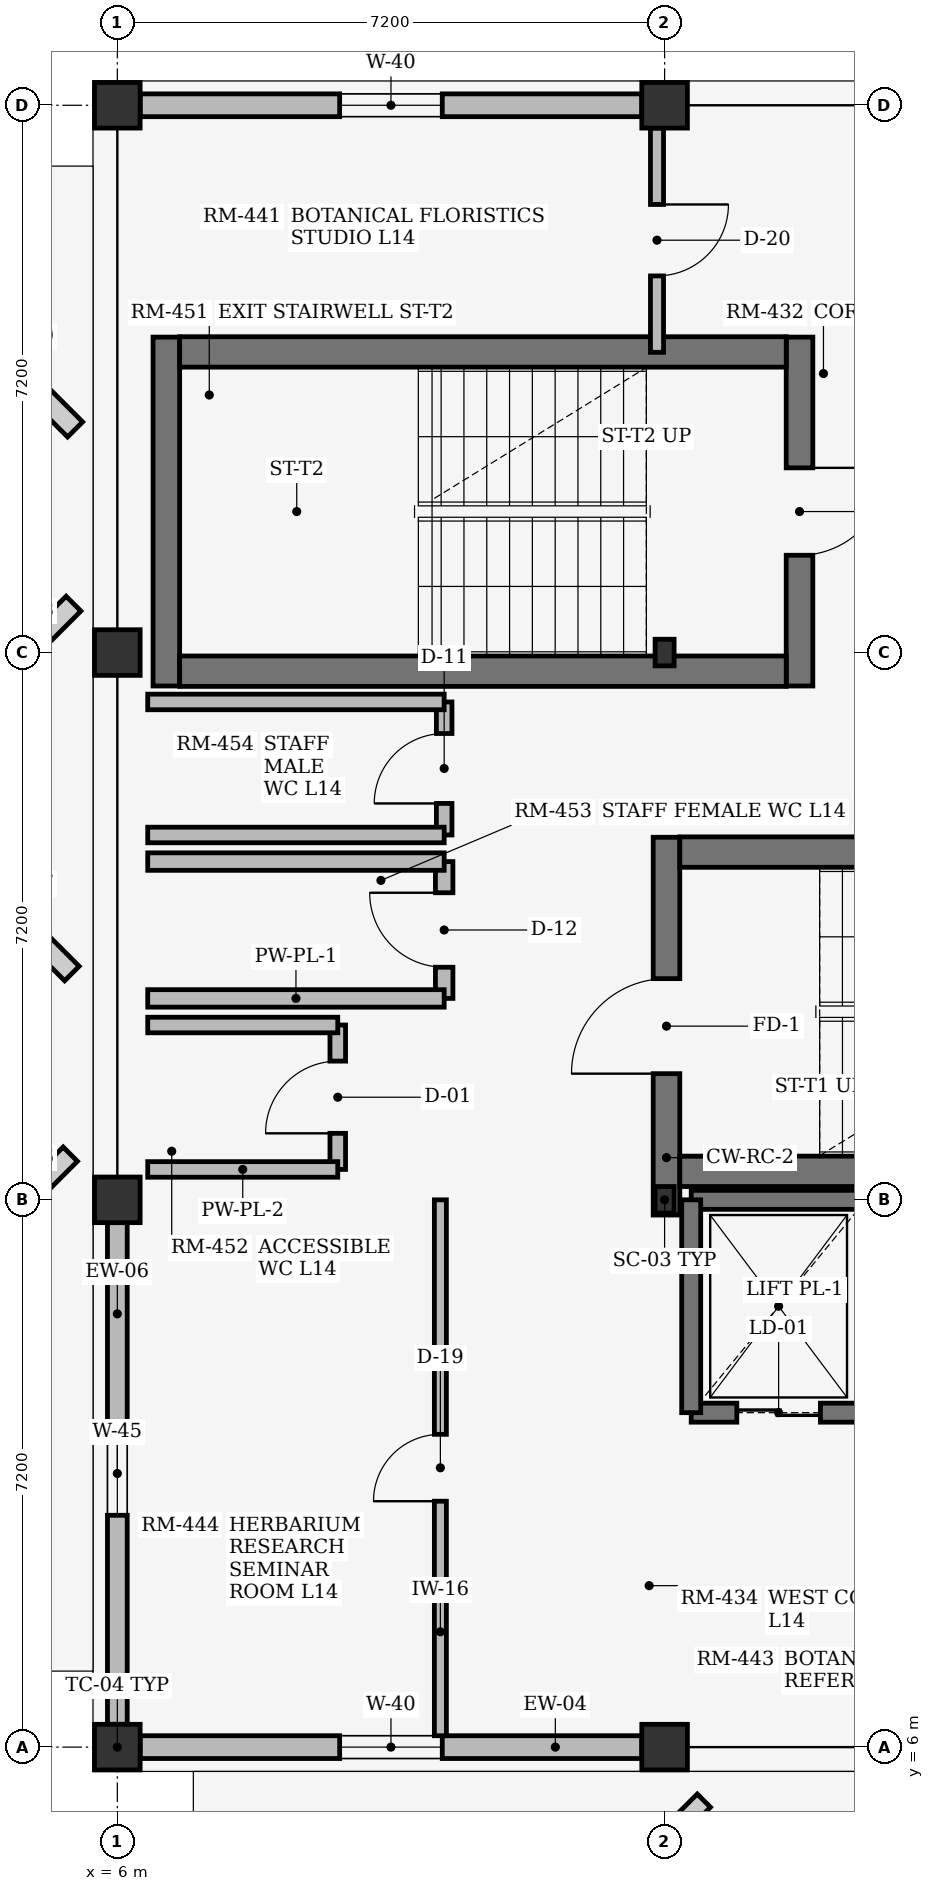
"""IFC4 building model, lengths in metres.
Left out: names, types, materials, properties, quantities, classifications, styles, units other than length and angle.
Written with IfcOpenShell. Run it as: python <this file> out.ifc"""

import sys

from ifc_helpers import new_model, si_unit, direction, frame, frame_2d, origin, origin_2d, place, context, subcontext, project, spatial, rectangle, i_section, extrude, element, fill, save


model = new_model("IFC4")
c1 = context("Model", 3, precision=1e-05, world=origin(), true_north=direction((0.0, 1.0)))
c2 = subcontext(c1, "Body", "Model", "MODEL_VIEW")
j1 = project(units=[si_unit("LENGTHUNIT", "METRE"), si_unit("PLANEANGLEUNIT", "RADIAN")], contexts=[c1])
p1 = place(None, origin())
s1 = spatial("IfcSite", under=j1, at=p1, CompositionType="ELEMENT")
p2 = place(p1, origin())
s2 = spatial("IfcBuilding", under=s1, at=p2, CompositionType="ELEMENT")
p3 = place(p2, frame((0.0, 0.0, 56.1)))
s3 = spatial("IfcBuildingStorey", under=s2, at=p3, CompositionType="ELEMENT", Elevation=56.1)
for number, where, z_axis, x_axis in (
    (1, (6.0, 6.0, 0.0), (0.0, 0.0, 1.0), (1.0, 0.0, 0.0)),
    (2, (6.0, 13.2, 0.0), (0.0, 0.0, 1.0), (1.0, 0.0, 0.0)),
    (3, (6.0, 20.4, 0.0), (0.0, 0.0, 1.0), (1.0, 0.0, 0.0)),
    (4, (6.0, 27.6, 0.0), (0.0, 0.0, 1.0), (1.0, 0.0, 0.0)),
    (5, (13.2, 6.0, 0.0), (0.0, 0.0, 1.0), (1.0, 0.0, 0.0)),
):
    element("IfcColumn", number, at=place(p3, frame(where, z_axis=z_axis, x_axis=x_axis)), inside=s3, PredefinedType="COLUMN", context=c2, shape_type="SweptSolid", body=[
        extrude(rectangle(XDim=0.6, YDim=0.6, at=origin_2d()), origin(), (0.0, 0.0, 1.0), 3.088),
    ])
for number, where, z_axis, x_axis in (
    (6, (13.2, 13.2, 0.0), (0.0, 0.0, 1.0), (1.0, 0.0, 0.0)),
    (7, (13.2, 20.4, 0.0), (0.0, 0.0, 1.0), (1.0, 0.0, 0.0)),
):
    element("IfcColumn", number, at=place(p3, frame(where, z_axis=z_axis, x_axis=x_axis)), inside=s3, PredefinedType="COLUMN", context=c2, shape_type="SweptSolid", body=[
        extrude(i_section(OverallWidth=0.25, OverallDepth=0.35, WebThickness=0.01, FlangeThickness=0.012, at=origin_2d()), origin(), (0.0, 0.0, 1.0), 3.088),
    ])
p4 = place(p3, frame((13.2, 27.6, 0.0), z_axis=(0.0, 0.0, 1.0), x_axis=(1.0, 0.0, 0.0)))
e8 = element("IfcColumn", 8, at=p4, inside=s3, PredefinedType="COLUMN", context=c2, shape_type="SweptSolid", body=[
    extrude(rectangle(XDim=0.6, YDim=0.6, at=origin_2d()), origin(), (0.0, 0.0, 1.0), 3.088),
])
p5 = place(p3, frame((6.3, 6.0, 0.0), z_axis=(0.0, 0.0, 1.0), x_axis=(1.0, 0.0, 0.0)))
e9 = element("IfcWall", 9, at=p5, inside=s3, PredefinedType="STANDARD", context=c2, shape_type="SweptSolid", body=[
    extrude(rectangle(XDim=6.6, YDim=0.3, at=frame_2d((3.3, 0.0))), origin(), (0.0, 0.0, 1.0), 2.695),
])
p6 = place(p5, frame((2.625, 0.0, 0.75)))
e10 = element("IfcOpeningElement", 10, at=p6, cuts=e9, PredefinedType="OPENING", context=c2, shape_type="SweptSolid", body=[
    extrude(rectangle(XDim=1.35, YDim=1.5, at=frame_2d((0.675, 0.75))), frame((0.0, 0.16, 0.0), z_axis=(0.0, -1.0, 0.0), x_axis=(1.0, 0.0, 0.0)), (0.0, 0.0, 1.0), 0.32),
])
p7 = place(p3, frame((6.3, 27.6, 0.0), z_axis=(0.0, 0.0, 1.0), x_axis=(1.0, 0.0, 0.0)))
e11 = element("IfcWall", 11, at=p7, inside=s3, PredefinedType="STANDARD", context=c2, shape_type="SweptSolid", body=[
    extrude(rectangle(XDim=6.6, YDim=0.3, at=frame_2d((3.3, 0.0))), origin(), (0.0, 0.0, 1.0), 2.695),
])
p8 = place(p7, frame((2.625, 0.0, 0.75)))
e12 = element("IfcOpeningElement", 12, at=p8, cuts=e11, PredefinedType="OPENING", context=c2, shape_type="SweptSolid", body=[
    extrude(rectangle(XDim=1.35, YDim=1.5, at=frame_2d((0.675, 0.75))), frame((0.0, 0.16, 0.0), z_axis=(0.0, -1.0, 0.0), x_axis=(1.0, 0.0, 0.0)), (0.0, 0.0, 1.0), 0.32),
])
p9 = place(p3, frame((6.0, 6.3, 0.0), z_axis=(0.0, 0.0, 1.0), x_axis=(0.0, 1.0, 0.0)))
e13 = element("IfcWall", 13, at=p9, inside=s3, PredefinedType="STANDARD", context=c2, shape_type="SweptSolid", body=[
    extrude(rectangle(XDim=6.6, YDim=0.26, at=frame_2d((3.3, 0.0))), origin(), (0.0, 0.0, 1.0), 2.695),
])
p10 = place(p9, frame((2.75, 0.0, 0.75)))
e14 = element("IfcOpeningElement", 14, at=p10, cuts=e13, PredefinedType="OPENING", context=c2, shape_type="SweptSolid", body=[
    extrude(rectangle(XDim=1.1, YDim=1.25, at=frame_2d((0.55, 0.625))), frame((0.0, 0.14, 0.0), z_axis=(0.0, -1.0, 0.0), x_axis=(1.0, 0.0, 0.0)), (0.0, 0.0, 1.0), 0.28),
])
p11 = place(p3, frame((13.225, 13.0, 0.0), z_axis=(0.0, 0.0, 1.0), x_axis=(0.0, 1.0, 0.0)))
e15 = element("IfcWall", 15, at=p11, inside=s3, PredefinedType="SHEAR", context=c2, shape_type="SweptSolid", body=[
    extrude(rectangle(XDim=4.97, YDim=0.35, at=frame_2d((2.485, 0.0))), origin(), (0.0, 0.0, 1.0), 3.115),
])
p12 = place(p11, frame((1.86, 0.0, 0.0)))
e16 = element("IfcOpeningElement", 16, at=p12, cuts=e15, PredefinedType="OPENING", context=c2, shape_type="SweptSolid", body=[
    extrude(rectangle(XDim=1.25, YDim=2.2, at=frame_2d((0.625, 1.1))), frame((0.0, 0.185, 0.0), z_axis=(0.0, -1.0, 0.0), x_axis=(1.0, 0.0, 0.0)), (0.0, 0.0, 1.0), 0.37),
])
for number, where, z_axis, x_axis in (
    (17, (13.4, 13.575, 0.0), (0.0, 0.0, 1.0), (1.0, 0.0, 0.0)),
    (18, (13.4, 17.775, 0.0), (0.0, 0.0, 1.0), (1.0, 0.0, 0.0)),
):
    element("IfcWall", number, at=place(p3, frame(where, z_axis=z_axis, x_axis=x_axis)), inside=s3, PredefinedType="SHEAR", context=c2, shape_type="SweptSolid", body=[
        extrude(rectangle(XDim=7.98, YDim=0.4, at=frame_2d((3.99, 0.0))), origin(), (0.0, 0.0, 1.0), 3.115),
    ])
p13 = place(p3, frame((14.975, 24.55, 0.0), z_axis=(0.0, 0.0, 1.0), x_axis=(0.0, -1.0, 0.0)))
e19 = element("IfcWall", 19, at=p13, inside=s3, PredefinedType="SHEAR", context=c2, shape_type="SweptSolid", body=[
    extrude(rectangle(XDim=4.59, YDim=0.35, at=frame_2d((2.295, 0.0))), origin(), (0.0, 0.0, 1.0), 3.115),
])
p14 = place(p13, frame((1.72, 0.0, 0.0)))
e20 = element("IfcOpeningElement", 20, at=p14, cuts=e19, PredefinedType="OPENING", context=c2, shape_type="SweptSolid", body=[
    extrude(rectangle(XDim=1.15, YDim=2.2, at=frame_2d((0.575, 1.1))), frame((0.0, 0.185, 0.0), z_axis=(0.0, -1.0, 0.0), x_axis=(1.0, 0.0, 0.0)), (0.0, 0.0, 1.0), 0.37),
])
p15 = place(p3, frame((6.645, 24.55, 0.0), z_axis=(0.0, 0.0, 1.0), x_axis=(0.0, -1.0, 0.0)))
e21 = element("IfcWall", 21, at=p15, inside=s3, PredefinedType="SHEAR", context=c2, shape_type="SweptSolid", body=[
    extrude(rectangle(XDim=4.59, YDim=0.35, at=frame_2d((2.295, 0.0))), origin(), (0.0, 0.0, 1.0), 3.115),
])
for number, where, z_axis, x_axis in (
    (22, (14.8, 24.355, 0.0), (0.0, 0.0, 1.0), (-1.0, 0.0, 0.0)),
    (23, (14.8, 20.155, 0.0), (0.0, 0.0, 1.0), (-1.0, 0.0, 0.0)),
):
    element("IfcWall", number, at=place(p3, frame(where, z_axis=z_axis, x_axis=x_axis)), inside=s3, PredefinedType="SHEAR", context=c2, shape_type="SweptSolid", body=[
        extrude(rectangle(XDim=7.98, YDim=0.4, at=frame_2d((3.99, 0.0))), origin(), (0.0, 0.0, 1.0), 3.115),
    ])
p16 = place(p3, frame((13.55, 10.4, 0.0), z_axis=(0.0, 0.0, 1.0), x_axis=(1.0, 0.0, 0.0)))
e24 = element("IfcWall", 24, at=p16, inside=s3, PredefinedType="SHEAR", context=c2, shape_type="SweptSolid", body=[
    extrude(rectangle(XDim=2.3, YDim=0.25, at=frame_2d((1.15, 0.0))), origin(), (0.0, 0.0, 1.0), 3.115),
])
p17 = place(p16, frame((0.6, 0.0, 0.0)))
e25 = element("IfcOpeningElement", 25, at=p17, cuts=e24, PredefinedType="OPENING", context=c2, shape_type="SweptSolid", body=[
    extrude(rectangle(XDim=1.1, YDim=2.2, at=frame_2d((0.55, 1.1))), frame((0.0, 0.135, 0.0), z_axis=(0.0, -1.0, 0.0), x_axis=(1.0, 0.0, 0.0)), (0.0, 0.0, 1.0), 0.27),
])
p18 = place(p3, frame((13.55, 13.2, 0.0), z_axis=(0.0, 0.0, 1.0), x_axis=(1.0, 0.0, 0.0)))
e26 = element("IfcWall", 26, at=p18, inside=s3, PredefinedType="SHEAR", context=c2, shape_type="SweptSolid", body=[
    extrude(rectangle(XDim=2.3, YDim=0.25, at=frame_2d((1.15, 0.0))), origin(), (0.0, 0.0, 1.0), 3.115),
])
p19 = place(p3, frame((13.55, 10.4, 0.0), z_axis=(0.0, 0.0, 1.0), x_axis=(0.0, 1.0, 0.0)))
e27 = element("IfcWall", 27, at=p19, inside=s3, PredefinedType="SHEAR", context=c2, shape_type="SweptSolid", body=[
    extrude(rectangle(XDim=2.8, YDim=0.25, at=frame_2d((1.4, 0.0))), origin(), (0.0, 0.0, 1.0), 3.115),
])
p20 = place(p3, frame((8.9, 13.6, 0.0), z_axis=(0.0, 0.0, 1.0), x_axis=(0.0, 1.0, 0.0)))
e28 = element("IfcWall", 28, at=p20, inside=s3, PredefinedType="PLUMBINGWALL", context=c2, shape_type="SweptSolid", body=[
    extrude(rectangle(XDim=1.9, YDim=0.205, at=frame_2d((0.95, 0.0))), origin(), (0.0, 0.0, 1.0), 3.095),
])
p21 = place(p20, frame((0.475, 0.0, 0.0)))
e29 = element("IfcOpeningElement", 29, at=p21, cuts=e28, PredefinedType="OPENING", context=c2, shape_type="SweptSolid", body=[
    extrude(rectangle(XDim=0.95, YDim=2.15, at=frame_2d((0.475, 1.075))), frame((0.0, 0.113, 0.0), z_axis=(0.0, -1.0, 0.0), x_axis=(1.0, 0.0, 0.0)), (0.0, 0.0, 1.0), 0.225),
])
for number, where, z_axis, x_axis in (
    (30, (6.4, 13.6, 0.0), (0.0, 0.0, 1.0), (1.0, 0.0, 0.0)),
    (31, (6.4, 15.5, 0.0), (0.0, 0.0, 1.0), (1.0, 0.0, 0.0)),
):
    element("IfcWall", number, at=place(p3, frame(where, z_axis=z_axis, x_axis=x_axis)), inside=s3, PredefinedType="PLUMBINGWALL", context=c2, shape_type="SweptSolid", body=[
        extrude(rectangle(XDim=2.5, YDim=0.205, at=frame_2d((1.25, 0.0))), origin(), (0.0, 0.0, 1.0), 3.095),
    ])
p22 = place(p3, frame((10.3, 15.85, 0.0), z_axis=(0.0, 0.0, 1.0), x_axis=(0.0, 1.0, 0.0)))
e32 = element("IfcWall", 32, at=p22, inside=s3, PredefinedType="PLUMBINGWALL", context=c2, shape_type="SweptSolid", body=[
    extrude(rectangle(XDim=1.8, YDim=0.23, at=frame_2d((0.9, 0.0))), origin(), (0.0, 0.0, 1.0), 3.095),
])
p23 = place(p22, frame((0.41, 0.0, 0.0)))
e33 = element("IfcOpeningElement", 33, at=p23, cuts=e32, PredefinedType="OPENING", context=c2, shape_type="SweptSolid", body=[
    extrude(rectangle(XDim=0.98, YDim=2.1, at=frame_2d((0.49, 1.05))), frame((0.0, 0.125, 0.0), z_axis=(0.0, -1.0, 0.0), x_axis=(1.0, 0.0, 0.0)), (0.0, 0.0, 1.0), 0.25),
])
for number, where, z_axis, x_axis in (
    (34, (6.4, 15.85, 0.0), (0.0, 0.0, 1.0), (1.0, 0.0, 0.0)),
    (35, (6.4, 17.65, 0.0), (0.0, 0.0, 1.0), (1.0, 0.0, 0.0)),
):
    element("IfcWall", number, at=place(p3, frame(where, z_axis=z_axis, x_axis=x_axis)), inside=s3, PredefinedType="PLUMBINGWALL", context=c2, shape_type="SweptSolid", body=[
        extrude(rectangle(XDim=3.9, YDim=0.23, at=frame_2d((1.95, 0.0))), origin(), (0.0, 0.0, 1.0), 3.095),
    ])
p24 = place(p3, frame((10.3, 18.0, 0.0), z_axis=(0.0, 0.0, 1.0), x_axis=(0.0, 1.0, 0.0)))
e36 = element("IfcWall", 36, at=p24, inside=s3, PredefinedType="PLUMBINGWALL", context=c2, shape_type="SweptSolid", body=[
    extrude(rectangle(XDim=1.75, YDim=0.205, at=frame_2d((0.875, 0.0))), origin(), (0.0, 0.0, 1.0), 3.095),
])
p25 = place(p24, frame((0.415, 0.0, 0.0)))
e37 = element("IfcOpeningElement", 37, at=p25, cuts=e36, PredefinedType="OPENING", context=c2, shape_type="SweptSolid", body=[
    extrude(rectangle(XDim=0.92, YDim=2.1, at=frame_2d((0.46, 1.05))), frame((0.0, 0.113, 0.0), z_axis=(0.0, -1.0, 0.0), x_axis=(1.0, 0.0, 0.0)), (0.0, 0.0, 1.0), 0.225),
])
for number, where, z_axis, x_axis in (
    (38, (6.4, 18.0, 0.0), (0.0, 0.0, 1.0), (1.0, 0.0, 0.0)),
    (39, (6.4, 19.75, 0.0), (0.0, 0.0, 1.0), (1.0, 0.0, 0.0)),
):
    element("IfcWall", number, at=place(p3, frame(where, z_axis=z_axis, x_axis=x_axis)), inside=s3, PredefinedType="PLUMBINGWALL", context=c2, shape_type="SweptSolid", body=[
        extrude(rectangle(XDim=3.9, YDim=0.205, at=frame_2d((1.95, 0.0))), origin(), (0.0, 0.0, 1.0), 3.095),
    ])
p26 = place(p3, frame((10.25, 6.15, 0.0), z_axis=(0.0, 0.0, 1.0), x_axis=(0.0, 1.0, 0.0)))
e40 = element("IfcWall", 40, at=p26, inside=s3, PredefinedType="PARTITIONING", context=c2, shape_type="SweptSolid", body=[
    extrude(rectangle(XDim=7.05, YDim=0.158, at=frame_2d((3.525, 0.0))), origin(), (0.0, 0.0, 1.0), 3.095),
])
p27 = place(p26, frame((3.085, 0.0, 0.0)))
e41 = element("IfcOpeningElement", 41, at=p27, cuts=e40, PredefinedType="OPENING", context=c2, shape_type="SweptSolid", body=[
    extrude(rectangle(XDim=0.88, YDim=2.12, at=frame_2d((0.44, 1.06))), frame((0.0, 0.089, 0.0), z_axis=(0.0, -1.0, 0.0), x_axis=(1.0, 0.0, 0.0)), (0.0, 0.0, 1.0), 0.178),
])
p28 = place(p3, frame((13.1, 24.35, 0.0), z_axis=(0.0, 0.0, 1.0), x_axis=(0.0, 1.0, 0.0)))
e42 = element("IfcWall", 42, at=p28, inside=s3, PredefinedType="PARTITIONING", context=c2, shape_type="SweptSolid", body=[
    extrude(rectangle(XDim=2.95, YDim=0.172, at=frame_2d((1.475, 0.0))), origin(), (0.0, 0.0, 1.0), 2.678),
])
p29 = place(p28, frame((1.005, 0.0, 0.0)))
e43 = element("IfcOpeningElement", 43, at=p29, cuts=e42, PredefinedType="OPENING", context=c2, shape_type="SweptSolid", body=[
    extrude(rectangle(XDim=0.94, YDim=2.18, at=frame_2d((0.47, 1.09))), frame((0.0, 0.096, 0.0), z_axis=(0.0, -1.0, 0.0), x_axis=(1.0, 0.0, 0.0)), (0.0, 0.0, 1.0), 0.192),
])
p30 = place(p6, origin())
e44 = element("IfcWindow", 44, at=p30, inside=s3, PartitioningType="SINGLE_PANEL", PredefinedType="WINDOW", context=c2, shape_type="SweptSolid", body=[
    extrude(rectangle(XDim=1.35, YDim=1.5, at=frame_2d((0.675, 0.75))), frame((0.0, 0.03, 0.0), z_axis=(0.0, -1.0, 0.0), x_axis=(1.0, 0.0, 0.0)), (0.0, 0.0, 1.0), 0.06),
])
fill(e10, e44)
p31 = place(p8, origin())
e45 = element("IfcWindow", 45, at=p31, inside=s3, PartitioningType="SINGLE_PANEL", PredefinedType="WINDOW", context=c2, shape_type="SweptSolid", body=[
    extrude(rectangle(XDim=1.35, YDim=1.5, at=frame_2d((0.675, 0.75))), frame((0.0, 0.03, 0.0), z_axis=(0.0, -1.0, 0.0), x_axis=(1.0, 0.0, 0.0)), (0.0, 0.0, 1.0), 0.06),
])
fill(e12, e45)
p32 = place(p10, origin())
e46 = element("IfcWindow", 46, at=p32, inside=s3, PartitioningType="SINGLE_PANEL", PredefinedType="WINDOW", context=c2, shape_type="SweptSolid", body=[
    extrude(rectangle(XDim=1.1, YDim=1.25, at=frame_2d((0.55, 0.625))), frame((0.0, 0.03, 0.0), z_axis=(0.0, -1.0, 0.0), x_axis=(1.0, 0.0, 0.0)), (0.0, 0.0, 1.0), 0.06),
])
fill(e14, e46)
p33 = place(p12, origin())
e47 = element("IfcDoor", 47, at=p33, inside=s3, OperationType="SINGLE_SWING_LEFT", PredefinedType="DOOR", context=c2, shape_type="SweptSolid", body=[
    extrude(rectangle(XDim=1.25, YDim=2.2, at=frame_2d((0.625, 1.1))), frame((0.0, 0.025, 0.0), z_axis=(0.0, -1.0, 0.0), x_axis=(1.0, 0.0, 0.0)), (0.0, 0.0, 1.0), 0.05),
])
fill(e16, e47)
p34 = place(p14, origin())
e48 = element("IfcDoor", 48, at=p34, inside=s3, OperationType="SINGLE_SWING_LEFT", PredefinedType="DOOR", context=c2, shape_type="SweptSolid", body=[
    extrude(rectangle(XDim=1.15, YDim=2.2, at=frame_2d((0.575, 1.1))), frame((0.0, 0.025, 0.0), z_axis=(0.0, -1.0, 0.0), x_axis=(1.0, 0.0, 0.0)), (0.0, 0.0, 1.0), 0.05),
])
fill(e20, e48)
p35 = place(p17, origin())
e49 = element("IfcDoor", 49, at=p35, inside=s3, OperationType="DOUBLE_DOOR_SLIDING", PredefinedType="DOOR", context=c2, shape_type="SweptSolid", body=[
    extrude(rectangle(XDim=1.1, YDim=2.2, at=frame_2d((0.55, 1.1))), frame((0.0, 0.025, 0.0), z_axis=(0.0, -1.0, 0.0), x_axis=(1.0, 0.0, 0.0)), (0.0, 0.0, 1.0), 0.05),
])
fill(e25, e49)
p36 = place(p21, origin())
e50 = element("IfcDoor", 50, at=p36, inside=s3, OperationType="SINGLE_SWING_LEFT", PredefinedType="DOOR", context=c2, shape_type="SweptSolid", body=[
    extrude(rectangle(XDim=0.95, YDim=2.15, at=frame_2d((0.475, 1.075))), frame((0.0, 0.025, 0.0), z_axis=(0.0, -1.0, 0.0), x_axis=(1.0, 0.0, 0.0)), (0.0, 0.0, 1.0), 0.05),
])
fill(e29, e50)
p37 = place(p23, frame((0.98, 0.0, 0.0), z_axis=(0.0, 0.0, 1.0), x_axis=(-1.0, 0.0, 0.0)))
e51 = element("IfcDoor", 51, at=p37, inside=s3, OperationType="SINGLE_SWING_RIGHT", PredefinedType="DOOR", context=c2, shape_type="SweptSolid", body=[
    extrude(rectangle(XDim=0.98, YDim=2.1, at=frame_2d((0.49, 1.05))), frame((0.0, 0.025, 0.0), z_axis=(0.0, -1.0, 0.0), x_axis=(1.0, 0.0, 0.0)), (0.0, 0.0, 1.0), 0.05),
])
fill(e33, e51)
p38 = place(p25, origin())
e52 = element("IfcDoor", 52, at=p38, inside=s3, OperationType="SINGLE_SWING_LEFT", PredefinedType="DOOR", context=c2, shape_type="SweptSolid", body=[
    extrude(rectangle(XDim=0.92, YDim=2.1, at=frame_2d((0.46, 1.05))), frame((0.0, 0.025, 0.0), z_axis=(0.0, -1.0, 0.0), x_axis=(1.0, 0.0, 0.0)), (0.0, 0.0, 1.0), 0.05),
])
fill(e37, e52)
p39 = place(p27, origin())
e53 = element("IfcDoor", 53, at=p39, inside=s3, OperationType="SINGLE_SWING_LEFT", PredefinedType="DOOR", context=c2, shape_type="SweptSolid", body=[
    extrude(rectangle(XDim=0.88, YDim=2.12, at=frame_2d((0.44, 1.06))), frame((0.0, 0.025, 0.0), z_axis=(0.0, -1.0, 0.0), x_axis=(1.0, 0.0, 0.0)), (0.0, 0.0, 1.0), 0.05),
])
fill(e41, e53)
p40 = place(p29, origin())
e54 = element("IfcDoor", 54, at=p40, inside=s3, OperationType="SINGLE_SWING_RIGHT", PredefinedType="DOOR", context=c2, shape_type="SweptSolid", body=[
    extrude(rectangle(XDim=0.94, YDim=2.18, at=frame_2d((0.47, 1.09))), frame((0.0, 0.025, 0.0), z_axis=(0.0, -1.0, 0.0), x_axis=(1.0, 0.0, 0.0)), (0.0, 0.0, 1.0), 0.05),
])
fill(e43, e54)
save(model, sys.argv[1])
